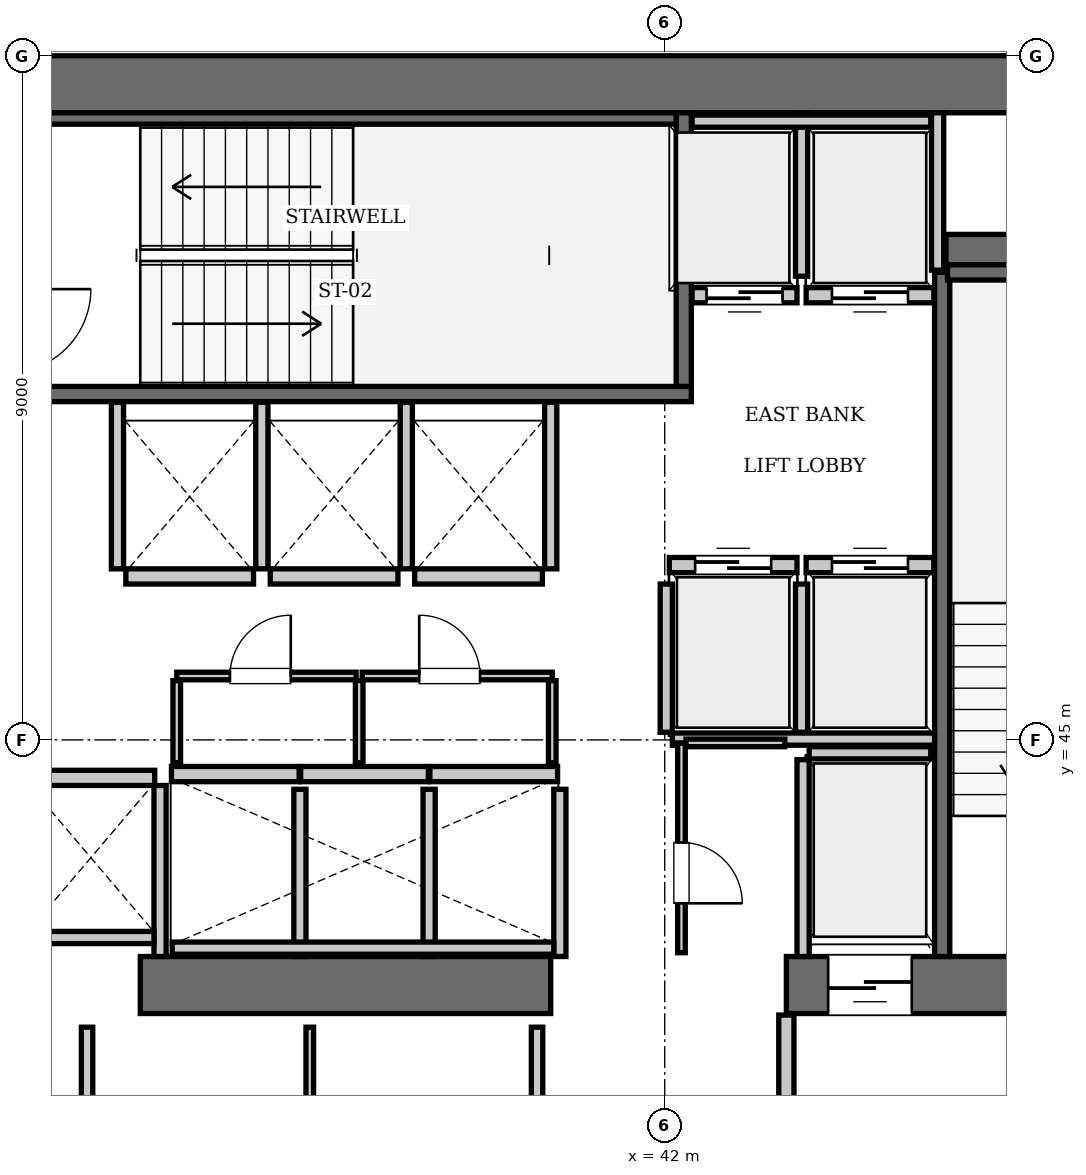
"""IFC4 building model, lengths in metres.
Left out: names, types, materials, properties, quantities, classifications, styles, units other than length and angle.
Written with IfcOpenShell. Run it as: python <this file> out.ifc"""

import sys

from ifc_helpers import new_model, si_unit, direction, frame, frame_2d, origin, place, context, subcontext, project, spatial, rectangle, extrude, element, fill, save


model = new_model("IFC4")
c1 = context("Model", 3, precision=1e-05, world=origin(), true_north=direction((0.0, 1.0)))
c2 = subcontext(c1, "Body", "Model", "MODEL_VIEW")
j1 = project(units=[si_unit("LENGTHUNIT", "METRE"), si_unit("PLANEANGLEUNIT", "RADIAN")], contexts=[c1])
p1 = place(None, origin())
s1 = spatial("IfcSite", under=j1, at=p1, CompositionType="ELEMENT")
p2 = place(p1, origin())
s2 = spatial("IfcBuilding", under=s1, at=p2, CompositionType="ELEMENT")
p3 = place(p2, frame((0.0, 0.0, 192.85)))
s3 = spatial("IfcBuildingStorey", under=s2, at=p3, CompositionType="ELEMENT", Elevation=192.85)
p4 = place(p3, frame((25.2, 53.625, 0.0), z_axis=(0.0, 0.0, 1.0), x_axis=(1.0, 0.0, 0.0)))
e1 = element("IfcWall", 1, at=p4, inside=s3, PredefinedType="SHEAR", context=c2, shape_type="SweptSolid", body=[
    extrude(rectangle(XDim=25.2, YDim=0.75, at=frame_2d((12.6, 0.0))), origin(), (0.0, 0.0, 1.0), 3.85),
])
p5 = place(p3, frame((35.1, 41.775, 0.0), z_axis=(0.0, 0.0, 1.0), x_axis=(1.0, 0.0, 0.0)))
e2 = element("IfcWall", 2, at=p5, inside=s3, PredefinedType="SHEAR", context=c2, shape_type="SweptSolid", body=[
    extrude(rectangle(XDim=5.4, YDim=0.75, at=frame_2d((2.7, 0.0))), origin(), (0.0, 0.0, 1.0), 3.85),
])
p6 = place(p3, frame((43.6, 41.775, 0.0), z_axis=(0.0, 0.0, 1.0), x_axis=(1.0, 0.0, 0.0)))
e3 = element("IfcWall", 3, at=p6, inside=s3, PredefinedType="SHEAR", context=c2, shape_type="SweptSolid", body=[
    extrude(rectangle(XDim=6.8, YDim=0.75, at=frame_2d((3.4, 0.0))), origin(), (0.0, 0.0, 1.0), 3.85),
])
p7 = place(p6, frame((3.9, 0.0, 0.0)))
e4 = element("IfcOpeningElement", 4, at=p7, cuts=e3, PredefinedType="OPENING", context=c2, shape_type="SweptSolid", body=[
    extrude(rectangle(XDim=1.15, YDim=2.15, at=frame_2d((0.575, 1.075))), frame((0.0, 0.385, 0.0), z_axis=(0.0, -1.0, 0.0), x_axis=(1.0, 0.0, 0.0)), (0.0, 0.0, 1.0), 0.77),
])
p8 = place(p6, frame((0.55, 0.0, 0.0)))
e5 = element("IfcOpeningElement", 5, at=p8, cuts=e3, PredefinedType="OPENING", context=c2, shape_type="SweptSolid", body=[
    extrude(rectangle(XDim=1.1, YDim=2.2, at=frame_2d((0.55, 1.1))), frame((0.0, 0.385, 0.0), z_axis=(0.0, -1.0, 0.0), x_axis=(1.0, 0.0, 0.0)), (0.0, 0.0, 1.0), 0.77),
])
p9 = place(p3, frame((45.7, 51.4, 0.0), z_axis=(0.0, 0.0, 1.0), x_axis=(1.0, 0.0, 0.0)))
e6 = element("IfcWall", 6, at=p9, inside=s3, PredefinedType="SHEAR", context=c2, shape_type="SweptSolid", body=[
    extrude(rectangle(XDim=3.95, YDim=0.5, at=frame_2d((1.975, 0.0))), origin(), (0.0, 0.0, 1.0), 3.85),
])
p10 = place(p3, frame((33.25, 49.55, 0.0), z_axis=(0.0, 0.0, 1.0), x_axis=(1.0, 0.0, 0.0)))
e7 = element("IfcWall", 7, at=p10, inside=s3, PredefinedType="SOLIDWALL", context=c2, shape_type="SweptSolid", body=[
    extrude(rectangle(XDim=9.1, YDim=0.2, at=frame_2d((4.55, 0.0))), origin(), (0.0, 0.0, 1.0), 3.61),
])
p11 = place(p3, frame((42.25, 49.65, 0.0), z_axis=(0.0, 0.0, 1.0), x_axis=(0.0, 1.0, 0.0)))
e8 = element("IfcWall", 8, at=p11, inside=s3, PredefinedType="SOLIDWALL", context=c2, shape_type="SweptSolid", body=[
    extrude(rectangle(XDim=3.6, YDim=0.2, at=frame_2d((1.8, 0.0))), origin(), (0.0, 0.0, 1.0), 3.61),
])
p12 = place(p3, frame((33.45, 53.175, 0.0), z_axis=(0.0, 0.0, 1.0), x_axis=(1.0, 0.0, 0.0)))
e9 = element("IfcWall", 9, at=p12, inside=s3, PredefinedType="SOLIDWALL", context=c2, shape_type="SweptSolid", body=[
    extrude(rectangle(XDim=8.7, YDim=0.15, at=frame_2d((4.35, 0.0))), origin(), (0.0, 0.0, 1.0), 3.61),
])
p13 = place(p3, frame((45.65, 42.15, 0.0), z_axis=(0.0, 0.0, 1.0), x_axis=(0.0, 1.0, 0.0)))
e10 = element("IfcWall", 10, at=p13, inside=s3, PredefinedType="SOLIDWALL", context=c2, shape_type="SweptSolid", body=[
    extrude(rectangle(XDim=9.0, YDim=0.2, at=frame_2d((4.5, 0.0))), origin(), (0.0, 0.0, 1.0), 3.61),
])
p14 = place(p3, frame((45.72, 51.15, 0.0), z_axis=(0.0, 0.0, 1.0), x_axis=(1.0, 0.0, 0.0)))
e11 = element("IfcWall", 11, at=p14, inside=s3, PredefinedType="SOLIDWALL", context=c2, shape_type="SweptSolid", body=[
    extrude(rectangle(XDim=3.5, YDim=0.2, at=frame_2d((1.75, 0.0))), origin(), (0.0, 0.0, 1.0), 3.61),
])
p15 = place(p3, frame((42.06, 47.3, 0.0), z_axis=(0.0, 0.0, 1.0), x_axis=(1.0, 0.0, 0.0)))
e12 = element("IfcWall", 12, at=p15, inside=s3, PredefinedType="SOLIDWALL", context=c2, shape_type="SweptSolid", body=[
    extrude(rectangle(XDim=1.68, YDim=0.2, at=frame_2d((0.84, 0.0))), origin(), (0.0, 0.0, 1.0), 3.61),
])
p16 = place(p15, frame((0.34, 0.0, 0.0)))
e13 = element("IfcOpeningElement", 13, at=p16, cuts=e12, PredefinedType="OPENING", context=c2, shape_type="SweptSolid", body=[
    extrude(rectangle(XDim=1.0, YDim=2.15, at=frame_2d((0.5, 1.075))), frame((0.0, 0.11, 0.0), z_axis=(0.0, -1.0, 0.0), x_axis=(1.0, 0.0, 0.0)), (0.0, 0.0, 1.0), 0.22),
])
p17 = place(p3, frame((43.86, 47.3, 0.0), z_axis=(0.0, 0.0, 1.0), x_axis=(1.0, 0.0, 0.0)))
e14 = element("IfcWall", 14, at=p17, inside=s3, PredefinedType="SOLIDWALL", context=c2, shape_type="SweptSolid", body=[
    extrude(rectangle(XDim=1.68, YDim=0.2, at=frame_2d((0.84, 0.0))), origin(), (0.0, 0.0, 1.0), 3.61),
])
p18 = place(p17, frame((0.34, 0.0, 0.0)))
e15 = element("IfcOpeningElement", 15, at=p18, cuts=e14, PredefinedType="OPENING", context=c2, shape_type="SweptSolid", body=[
    extrude(rectangle(XDim=1.0, YDim=2.15, at=frame_2d((0.5, 1.075))), frame((0.0, 0.11, 0.0), z_axis=(0.0, -1.0, 0.0), x_axis=(1.0, 0.0, 0.0)), (0.0, 0.0, 1.0), 0.22),
])
p19 = place(p3, frame((42.36, 50.85, 0.0), z_axis=(0.0, 0.0, 1.0), x_axis=(1.0, 0.0, 0.0)))
e16 = element("IfcWall", 16, at=p19, inside=s3, PredefinedType="SOLIDWALL", context=c2, shape_type="SweptSolid", body=[
    extrude(rectangle(XDim=1.38, YDim=0.2, at=frame_2d((0.69, 0.0))), origin(), (0.0, 0.0, 1.0), 3.61),
])
p20 = place(p19, frame((0.19, 0.0, 0.0)))
e17 = element("IfcOpeningElement", 17, at=p20, cuts=e16, PredefinedType="OPENING", context=c2, shape_type="SweptSolid", body=[
    extrude(rectangle(XDim=1.0, YDim=2.15, at=frame_2d((0.5, 1.075))), frame((0.0, 0.11, 0.0), z_axis=(0.0, -1.0, 0.0), x_axis=(1.0, 0.0, 0.0)), (0.0, 0.0, 1.0), 0.22),
])
p21 = place(p3, frame((43.86, 50.85, 0.0), z_axis=(0.0, 0.0, 1.0), x_axis=(1.0, 0.0, 0.0)))
e18 = element("IfcWall", 18, at=p21, inside=s3, PredefinedType="SOLIDWALL", context=c2, shape_type="SweptSolid", body=[
    extrude(rectangle(XDim=1.68, YDim=0.2, at=frame_2d((0.84, 0.0))), origin(), (0.0, 0.0, 1.0), 3.61),
])
p22 = place(p21, frame((0.34, 0.0, 0.0)))
e19 = element("IfcOpeningElement", 19, at=p22, cuts=e18, PredefinedType="OPENING", context=c2, shape_type="SweptSolid", body=[
    extrude(rectangle(XDim=1.0, YDim=2.15, at=frame_2d((0.5, 1.075))), frame((0.0, 0.11, 0.0), z_axis=(0.0, -1.0, 0.0), x_axis=(1.0, 0.0, 0.0)), (0.0, 0.0, 1.0), 0.22),
])
for number, where, z_axis, x_axis in (
    (20, (35.51, 44.55, 0.0), (0.0, 0.0, 1.0), (1.0, 0.0, 0.0)),
    (21, (37.21, 44.55, 0.0), (0.0, 0.0, 1.0), (1.0, 0.0, 0.0)),
):
    element("IfcWall", number, at=place(p3, frame(where, z_axis=z_axis, x_axis=x_axis)), inside=s3, PredefinedType="SOLIDWALL", context=c2, shape_type="SweptSolid", body=[
        extrude(rectangle(XDim=1.68, YDim=0.2, at=frame_2d((0.84, 0.0))), origin(), (0.0, 0.0, 1.0), 3.61),
    ])
for number, where, z_axis, x_axis in (
    (22, (38.91, 44.55, 0.0), (0.0, 0.0, 1.0), (1.0, 0.0, 0.0)),
    (23, (34.91, 47.15, 0.0), (0.0, 0.0, 1.0), (1.0, 0.0, 0.0)),
):
    element("IfcWall", number, at=place(p3, frame(where, z_axis=z_axis, x_axis=x_axis)), inside=s3, PredefinedType="SOLIDWALL", context=c2, shape_type="SweptSolid", body=[
        extrude(rectangle(XDim=1.68, YDim=0.2, at=frame_2d((0.84, 0.0))), origin(), (0.0, 0.0, 1.0), 3.61),
    ])
for number, where, z_axis, x_axis in (
    (24, (36.81, 47.15, 0.0), (0.0, 0.0, 1.0), (1.0, 0.0, 0.0)),
    (25, (38.71, 47.15, 0.0), (0.0, 0.0, 1.0), (1.0, 0.0, 0.0)),
    (26, (33.61, 44.5, 0.0), (0.0, 0.0, 1.0), (1.0, 0.0, 0.0)),
):
    element("IfcWall", number, at=place(p3, frame(where, z_axis=z_axis, x_axis=x_axis)), inside=s3, PredefinedType="SOLIDWALL", context=c2, shape_type="SweptSolid", body=[
        extrude(rectangle(XDim=1.68, YDim=0.2, at=frame_2d((0.84, 0.0))), origin(), (0.0, 0.0, 1.0), 3.61),
    ])
p23 = place(p3, frame((43.9, 44.83, 0.0), z_axis=(0.0, 0.0, 1.0), x_axis=(1.0, 0.0, 0.0)))
e27 = element("IfcWall", 27, at=p23, inside=s3, PredefinedType="SOLIDWALL", context=c2, shape_type="SweptSolid", body=[
    extrude(rectangle(XDim=1.6, YDim=0.16, at=frame_2d((0.8, 0.0))), origin(), (0.0, 0.0, 1.0), 3.61),
])
p24 = place(p3, frame((43.82, 42.15, 0.0), z_axis=(0.0, 0.0, 1.0), x_axis=(0.0, 1.0, 0.0)))
e28 = element("IfcWall", 28, at=p24, inside=s3, PredefinedType="SOLIDWALL", context=c2, shape_type="SweptSolid", body=[
    extrude(rectangle(XDim=2.59, YDim=0.16, at=frame_2d((1.295, 0.0))), origin(), (0.0, 0.0, 1.0), 3.61),
])
for number, where, z_axis, x_axis in (
    (29, (42.02, 45.1, 0.0), (0.0, 0.0, 1.0), (0.0, 1.0, 0.0)),
    (30, (43.8, 45.1, 0.0), (0.0, 0.0, 1.0), (0.0, 1.0, 0.0)),
):
    element("IfcWall", number, at=place(p3, frame(where, z_axis=z_axis, x_axis=x_axis)), inside=s3, PredefinedType="SOLIDWALL", context=c2, shape_type="SweptSolid", body=[
        extrude(rectangle(XDim=1.95, YDim=0.16, at=frame_2d((0.975, 0.0))), origin(), (0.0, 0.0, 1.0), 3.61),
    ])
p25 = place(p3, frame((42.1, 45.01, 0.0), z_axis=(0.0, 0.0, 1.0), x_axis=(1.0, 0.0, 0.0)))
e31 = element("IfcWall", 31, at=p25, inside=s3, PredefinedType="SOLIDWALL", context=c2, shape_type="SweptSolid", body=[
    extrude(rectangle(XDim=3.45, YDim=0.16, at=frame_2d((1.725, 0.0))), origin(), (0.0, 0.0, 1.0), 3.61),
])
p26 = place(p3, frame((45.59, 51.18, 0.0), z_axis=(0.0, 0.0, 1.0), x_axis=(0.0, 1.0, 0.0)))
e32 = element("IfcWall", 32, at=p26, inside=s3, PredefinedType="SOLIDWALL", context=c2, shape_type="SweptSolid", body=[
    extrude(rectangle(XDim=2.07, YDim=0.16, at=frame_2d((1.035, 0.0))), origin(), (0.0, 0.0, 1.0), 3.61),
])
p27 = place(p3, frame((43.8, 51.1, 0.0), z_axis=(0.0, 0.0, 1.0), x_axis=(0.0, 1.0, 0.0)))
e33 = element("IfcWall", 33, at=p27, inside=s3, PredefinedType="SOLIDWALL", context=c2, shape_type="SweptSolid", body=[
    extrude(rectangle(XDim=2.15, YDim=0.16, at=frame_2d((1.075, 0.0))), origin(), (0.0, 0.0, 1.0), 3.61),
])
p28 = place(p3, frame((42.36, 53.14, 0.0), z_axis=(0.0, 0.0, 1.0), x_axis=(1.0, 0.0, 0.0)))
e34 = element("IfcWall", 34, at=p28, inside=s3, PredefinedType="SOLIDWALL", context=c2, shape_type="SweptSolid", body=[
    extrude(rectangle(XDim=3.14, YDim=0.16, at=frame_2d((1.57, 0.0))), origin(), (0.0, 0.0, 1.0), 3.61),
])
for number, where, z_axis, x_axis in (
    (35, (37.2, 42.15, 0.0), (0.0, 0.0, 1.0), (0.0, 1.0, 0.0)),
    (36, (38.9, 42.15, 0.0), (0.0, 0.0, 1.0), (0.0, 1.0, 0.0)),
    (37, (40.62, 42.15, 0.0), (0.0, 0.0, 1.0), (0.0, 1.0, 0.0)),
):
    element("IfcWall", number, at=place(p3, frame(where, z_axis=z_axis, x_axis=x_axis)), inside=s3, PredefinedType="SOLIDWALL", context=c2, shape_type="SweptSolid", body=[
        extrude(rectangle(XDim=2.2, YDim=0.16, at=frame_2d((1.1, 0.0))), origin(), (0.0, 0.0, 1.0), 3.61),
    ])
p29 = place(p3, frame((35.52, 42.26, 0.0), z_axis=(0.0, 0.0, 1.0), x_axis=(1.0, 0.0, 0.0)))
e38 = element("IfcWall", 38, at=p29, inside=s3, PredefinedType="SOLIDWALL", context=c2, shape_type="SweptSolid", body=[
    extrude(rectangle(XDim=5.02, YDim=0.16, at=frame_2d((2.51, 0.0))), origin(), (0.0, 0.0, 1.0), 3.61),
])
for number, where, z_axis, x_axis in (
    (39, (34.8, 47.25, 0.0), (0.0, 0.0, 1.0), (0.0, 1.0, 0.0)),
    (40, (36.7, 47.25, 0.0), (0.0, 0.0, 1.0), (0.0, 1.0, 0.0)),
    (41, (38.6, 47.25, 0.0), (0.0, 0.0, 1.0), (0.0, 1.0, 0.0)),
    (42, (40.5, 47.25, 0.0), (0.0, 0.0, 1.0), (0.0, 1.0, 0.0)),
):
    element("IfcWall", number, at=place(p3, frame(where, z_axis=z_axis, x_axis=x_axis)), inside=s3, PredefinedType="SOLIDWALL", context=c2, shape_type="SweptSolid", body=[
        extrude(rectangle(XDim=2.19, YDim=0.16, at=frame_2d((1.095, 0.0))), origin(), (0.0, 0.0, 1.0), 3.61),
    ])
p30 = place(p3, frame((35.36, 42.15, 0.0), z_axis=(0.0, 0.0, 1.0), x_axis=(0.0, 1.0, 0.0)))
e43 = element("IfcWall", 43, at=p30, inside=s3, PredefinedType="SOLIDWALL", context=c2, shape_type="SweptSolid", body=[
    extrude(rectangle(XDim=2.25, YDim=0.16, at=frame_2d((1.125, 0.0))), origin(), (0.0, 0.0, 1.0), 3.61),
])
p31 = place(p3, frame((33.62, 42.4, 0.0), z_axis=(0.0, 0.0, 1.0), x_axis=(1.0, 0.0, 0.0)))
e44 = element("IfcWall", 44, at=p31, inside=s3, PredefinedType="SOLIDWALL", context=c2, shape_type="SweptSolid", body=[
    extrude(rectangle(XDim=1.66, YDim=0.16, at=frame_2d((0.83, 0.0))), origin(), (0.0, 0.0, 1.0), 3.61),
])
p32 = place(p3, frame((43.6, 38.31, 0.0), z_axis=(0.0, 0.0, 1.0), x_axis=(0.0, 1.0, 0.0)))
e45 = element("IfcWall", 45, at=p32, inside=s3, PredefinedType="PARTITIONING", context=c2, shape_type="SweptSolid", body=[
    extrude(rectangle(XDim=3.07, YDim=0.2, at=frame_2d((1.535, 0.0))), origin(), (0.0, 0.0, 1.0), 3.61),
])
p33 = place(p3, frame((35.58, 45.84, 0.0), z_axis=(0.0, 0.0, 1.0), x_axis=(1.0, 0.0, 0.0)))
e46 = element("IfcWall", 46, at=p33, inside=s3, PredefinedType="PARTITIONING", context=c2, shape_type="SweptSolid", body=[
    extrude(rectangle(XDim=2.36, YDim=0.1, at=frame_2d((1.18, 0.0))), origin(), (0.0, 0.0, 1.0), 3.61),
])
p34 = place(p33, frame((0.7, 0.0, 0.0)))
e47 = element("IfcOpeningElement", 47, at=p34, cuts=e46, PredefinedType="OPENING", context=c2, shape_type="SweptSolid", body=[
    extrude(rectangle(XDim=0.8, YDim=2.05, at=frame_2d((0.4, 1.025))), frame((0.0, 0.06, 0.0), z_axis=(0.0, -1.0, 0.0), x_axis=(1.0, 0.0, 0.0)), (0.0, 0.0, 1.0), 0.12),
])
p35 = place(p3, frame((38.02, 45.84, 0.0), z_axis=(0.0, 0.0, 1.0), x_axis=(1.0, 0.0, 0.0)))
e48 = element("IfcWall", 48, at=p35, inside=s3, PredefinedType="PARTITIONING", context=c2, shape_type="SweptSolid", body=[
    extrude(rectangle(XDim=2.5, YDim=0.1, at=frame_2d((1.25, 0.0))), origin(), (0.0, 0.0, 1.0), 3.61),
])
p36 = place(p35, frame((0.75, 0.0, 0.0)))
e49 = element("IfcOpeningElement", 49, at=p36, cuts=e48, PredefinedType="OPENING", context=c2, shape_type="SweptSolid", body=[
    extrude(rectangle(XDim=0.8, YDim=2.05, at=frame_2d((0.4, 1.025))), frame((0.0, 0.06, 0.0), z_axis=(0.0, -1.0, 0.0), x_axis=(1.0, 0.0, 0.0)), (0.0, 0.0, 1.0), 0.12),
])
for number, where, z_axis, x_axis in (
    (50, (35.58, 44.7, 0.0), (0.0, 0.0, 1.0), (0.0, 1.0, 0.0)),
    (51, (37.98, 44.7, 0.0), (0.0, 0.0, 1.0), (0.0, 1.0, 0.0)),
    (52, (40.52, 44.7, 0.0), (0.0, 0.0, 1.0), (0.0, 1.0, 0.0)),
):
    element("IfcWall", number, at=place(p3, frame(where, z_axis=z_axis, x_axis=x_axis)), inside=s3, PredefinedType="PARTITIONING", context=c2, shape_type="SweptSolid", body=[
        extrude(rectangle(XDim=1.08, YDim=0.1, at=frame_2d((0.54, 0.0))), origin(), (0.0, 0.0, 1.0), 3.61),
    ])
p37 = place(p3, frame((42.22, 42.2, 0.0), z_axis=(0.0, 0.0, 1.0), x_axis=(0.0, 1.0, 0.0)))
e53 = element("IfcWall", 53, at=p37, inside=s3, PredefinedType="PARTITIONING", context=c2, shape_type="SweptSolid", body=[
    extrude(rectangle(XDim=2.76, YDim=0.1, at=frame_2d((1.38, 0.0))), origin(), (0.0, 0.0, 1.0), 3.61),
])
p38 = place(p37, frame((0.65, 0.0, 0.0)))
e54 = element("IfcOpeningElement", 54, at=p38, cuts=e53, PredefinedType="OPENING", context=c2, shape_type="SweptSolid", body=[
    extrude(rectangle(XDim=0.8, YDim=2.05, at=frame_2d((0.4, 1.025))), frame((0.0, 0.06, 0.0), z_axis=(0.0, -1.0, 0.0), x_axis=(1.0, 0.0, 0.0)), (0.0, 0.0, 1.0), 0.12),
])
p39 = place(p3, frame((42.28, 44.96, 0.0), z_axis=(0.0, 0.0, 1.0), x_axis=(1.0, 0.0, 0.0)))
e55 = element("IfcWall", 55, at=p39, inside=s3, PredefinedType="PARTITIONING", context=c2, shape_type="SweptSolid", body=[
    extrude(rectangle(XDim=1.3, YDim=0.1, at=frame_2d((0.65, 0.0))), origin(), (0.0, 0.0, 1.0), 3.61),
])
p40 = place(p3, frame((34.4, 38.38, 0.0), z_axis=(0.0, 0.0, 1.0), x_axis=(0.0, 1.0, 0.0)))
e56 = element("IfcWall", 56, at=p40, inside=s3, PredefinedType="PARTITIONING", context=c2, shape_type="SweptSolid", body=[
    extrude(rectangle(XDim=2.84, YDim=0.15, at=frame_2d((1.42, 0.0))), origin(), (0.0, 0.0, 1.0), 3.61),
])
p41 = place(p3, frame((37.33, 38.38, 0.0), z_axis=(0.0, 0.0, 1.0), x_axis=(0.0, 1.0, 0.0)))
e57 = element("IfcWall", 57, at=p41, inside=s3, PredefinedType="PARTITIONING", context=c2, shape_type="SweptSolid", body=[
    extrude(rectangle(XDim=2.84, YDim=0.1, at=frame_2d((1.42, 0.0))), origin(), (0.0, 0.0, 1.0), 3.61),
])
p42 = place(p3, frame((40.32, 38.38, 0.0), z_axis=(0.0, 0.0, 1.0), x_axis=(0.0, 1.0, 0.0)))
e58 = element("IfcWall", 58, at=p42, inside=s3, PredefinedType="PARTITIONING", context=c2, shape_type="SweptSolid", body=[
    extrude(rectangle(XDim=2.84, YDim=0.15, at=frame_2d((1.42, 0.0))), origin(), (0.0, 0.0, 1.0), 3.61),
])
p43 = place(p16, origin())
e59 = element("IfcDoor", 59, at=p43, inside=s3, OperationType="SLIDING_TO_LEFT", PredefinedType="DOOR", context=c2, shape_type="SweptSolid", body=[
    extrude(rectangle(XDim=1.0, YDim=2.15, at=frame_2d((0.5, 1.075))), frame((0.0, 0.025, 0.0), z_axis=(0.0, -1.0, 0.0), x_axis=(1.0, 0.0, 0.0)), (0.0, 0.0, 1.0), 0.05),
])
fill(e13, e59)
p44 = place(p18, origin())
e60 = element("IfcDoor", 60, at=p44, inside=s3, OperationType="SLIDING_TO_LEFT", PredefinedType="DOOR", context=c2, shape_type="SweptSolid", body=[
    extrude(rectangle(XDim=1.0, YDim=2.15, at=frame_2d((0.5, 1.075))), frame((0.0, 0.025, 0.0), z_axis=(0.0, -1.0, 0.0), x_axis=(1.0, 0.0, 0.0)), (0.0, 0.0, 1.0), 0.05),
])
fill(e15, e60)
p45 = place(p20, frame((1.0, 0.0, 0.0), z_axis=(0.0, 0.0, 1.0), x_axis=(-1.0, 0.0, 0.0)))
e61 = element("IfcDoor", 61, at=p45, inside=s3, OperationType="SLIDING_TO_LEFT", PredefinedType="DOOR", context=c2, shape_type="SweptSolid", body=[
    extrude(rectangle(XDim=1.0, YDim=2.15, at=frame_2d((0.5, 1.075))), frame((0.0, 0.025, 0.0), z_axis=(0.0, -1.0, 0.0), x_axis=(1.0, 0.0, 0.0)), (0.0, 0.0, 1.0), 0.05),
])
fill(e17, e61)
p46 = place(p22, frame((1.0, 0.0, 0.0), z_axis=(0.0, 0.0, 1.0), x_axis=(-1.0, 0.0, 0.0)))
e62 = element("IfcDoor", 62, at=p46, inside=s3, OperationType="SLIDING_TO_LEFT", PredefinedType="DOOR", context=c2, shape_type="SweptSolid", body=[
    extrude(rectangle(XDim=1.0, YDim=2.15, at=frame_2d((0.5, 1.075))), frame((0.0, 0.025, 0.0), z_axis=(0.0, -1.0, 0.0), x_axis=(1.0, 0.0, 0.0)), (0.0, 0.0, 1.0), 0.05),
])
fill(e19, e62)
p47 = place(p8, frame((1.1, 0.0, 0.0), z_axis=(0.0, 0.0, 1.0), x_axis=(-1.0, 0.0, 0.0)))
e63 = element("IfcDoor", 63, at=p47, inside=s3, OperationType="SLIDING_TO_LEFT", PredefinedType="DOOR", context=c2, shape_type="SweptSolid", body=[
    extrude(rectangle(XDim=1.1, YDim=2.2, at=frame_2d((0.55, 1.1))), frame((0.0, 0.025, 0.0), z_axis=(0.0, -1.0, 0.0), x_axis=(1.0, 0.0, 0.0)), (0.0, 0.0, 1.0), 0.05),
])
fill(e5, e63)
p48 = place(p34, origin())
e64 = element("IfcDoor", 64, at=p48, inside=s3, OperationType="SINGLE_SWING_RIGHT", PredefinedType="DOOR", context=c2, shape_type="SweptSolid", body=[
    extrude(rectangle(XDim=0.8, YDim=2.05, at=frame_2d((0.4, 1.025))), frame((0.0, 0.025, 0.0), z_axis=(0.0, -1.0, 0.0), x_axis=(1.0, 0.0, 0.0)), (0.0, 0.0, 1.0), 0.05),
])
fill(e47, e64)
p49 = place(p36, origin())
e65 = element("IfcDoor", 65, at=p49, inside=s3, OperationType="SINGLE_SWING_LEFT", PredefinedType="DOOR", context=c2, shape_type="SweptSolid", body=[
    extrude(rectangle(XDim=0.8, YDim=2.05, at=frame_2d((0.4, 1.025))), frame((0.0, 0.025, 0.0), z_axis=(0.0, -1.0, 0.0), x_axis=(1.0, 0.0, 0.0)), (0.0, 0.0, 1.0), 0.05),
])
fill(e49, e65)
p50 = place(p38, frame((0.8, 0.0, 0.0), z_axis=(0.0, 0.0, 1.0), x_axis=(-1.0, 0.0, 0.0)))
e66 = element("IfcDoor", 66, at=p50, inside=s3, OperationType="SINGLE_SWING_RIGHT", PredefinedType="DOOR", context=c2, shape_type="SweptSolid", body=[
    extrude(rectangle(XDim=0.8, YDim=2.05, at=frame_2d((0.4, 1.025))), frame((0.0, 0.025, 0.0), z_axis=(0.0, -1.0, 0.0), x_axis=(1.0, 0.0, 0.0)), (0.0, 0.0, 1.0), 0.05),
])
fill(e54, e66)
save(model, sys.argv[1])
